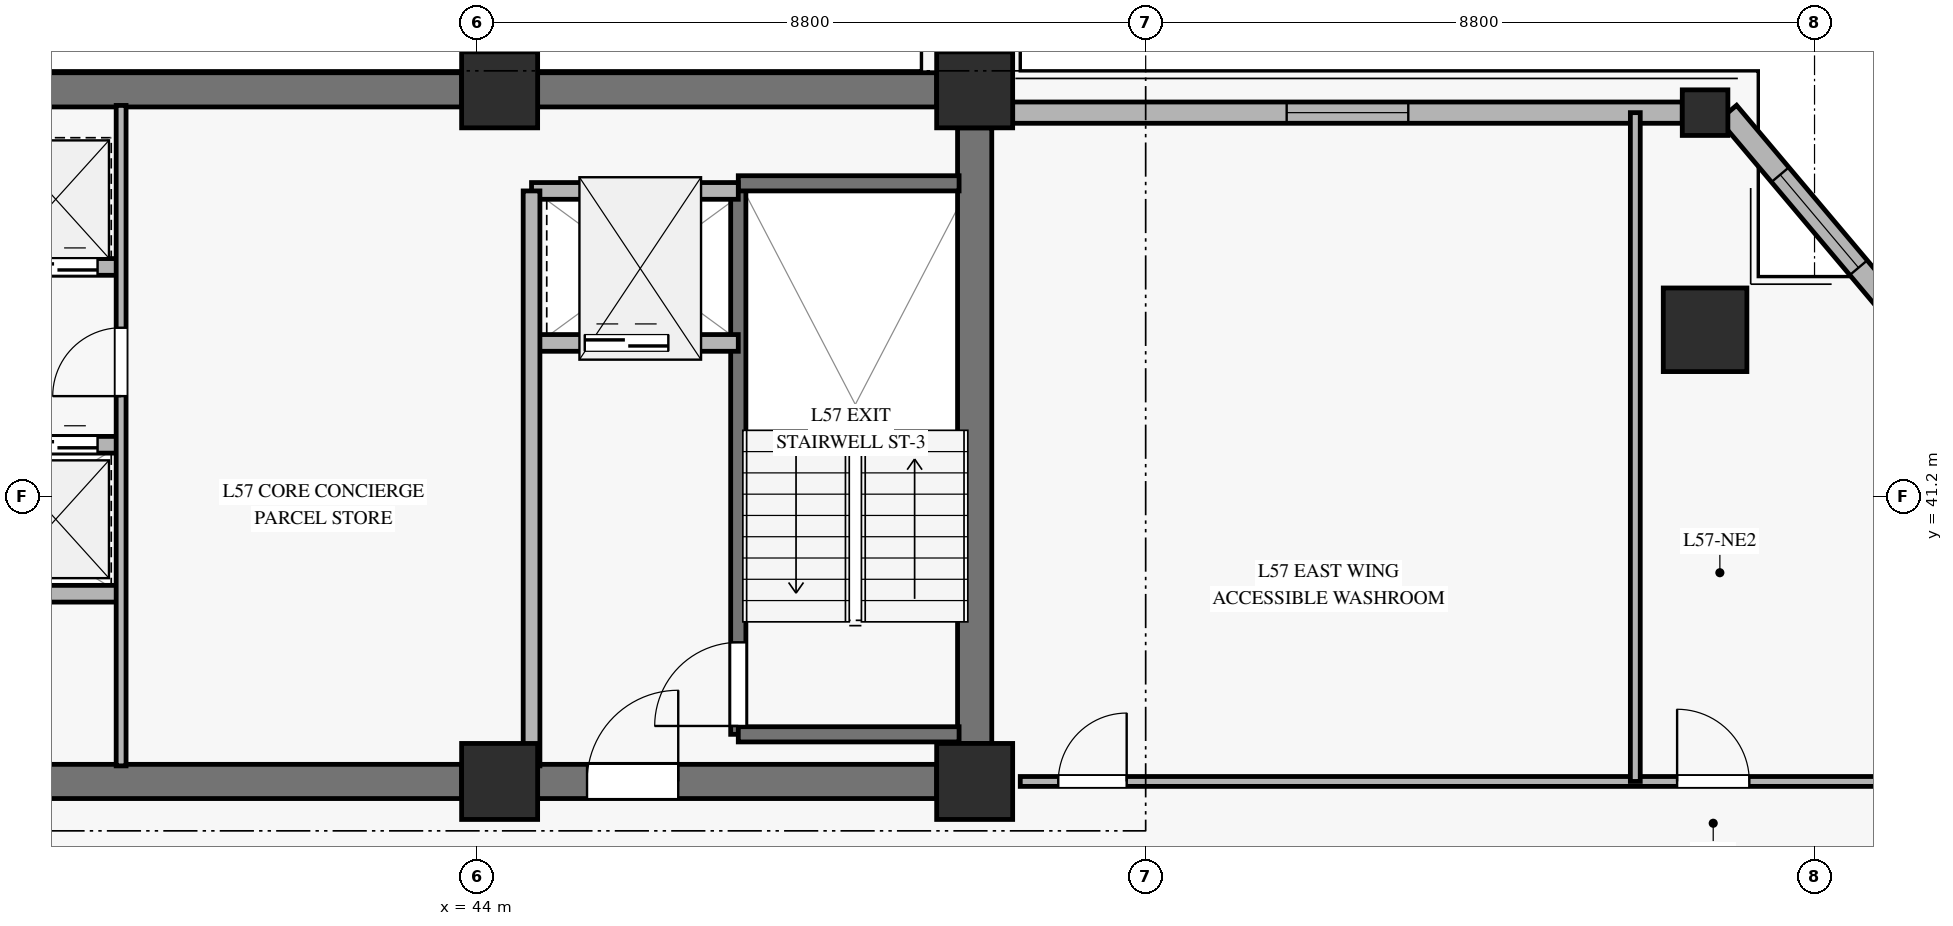
"""IFC4 building model, lengths in metres.
Left out: names, types, materials, properties, quantities, classifications, styles, units other than length and angle.
Written with IfcOpenShell. Run it as: python <this file> out.ifc"""

import sys

from ifc_helpers import new_model, si_unit, direction, frame, frame_2d, origin, origin_2d, place, context, subcontext, project, spatial, rectangle, hollow_rectangle, extrude, source, transform, mapped, element, fill, save


model = new_model("IFC4")
c1 = context("Model", 3, precision=1e-05, world=origin(), true_north=direction((0.0, 1.0)))
c2 = subcontext(c1, "Body", "Model", "MODEL_VIEW")
j1 = project(units=[si_unit("LENGTHUNIT", "METRE"), si_unit("PLANEANGLEUNIT", "RADIAN")], contexts=[c1])
p1 = place(None, origin())
s1 = spatial("IfcSite", under=j1, at=p1, CompositionType="ELEMENT")
p2 = place(p1, origin())
s2 = spatial("IfcBuilding", under=s1, at=p2, CompositionType="ELEMENT")
p3 = place(p2, frame((0.0, 0.0, 227.0)))
s3 = spatial("IfcBuildingStorey", under=s2, at=p3, CompositionType="ELEMENT", Elevation=227.0)
m1 = source(origin(), c2, "Body", "SweptSolid", [
    extrude(rectangle(XDim=1.0, YDim=1.0, at=origin_2d()), origin(), (0.0, 0.0, 1.0), 3.185),
])
for number, where, z_axis, x_axis in (
    (1, (44.3, 37.45, 0.0), (0.0, 0.0, 1.0), (1.0, 0.0, 0.0)),
    (2, (44.3, 46.55, 0.0), (0.0, 0.0, 1.0), (1.0, 0.0, 0.0)),
    (3, (50.55, 37.45, 0.0), (0.0, 0.0, 1.0), (1.0, 0.0, 0.0)),
    (4, (50.55, 46.55, 0.0), (0.0, 0.0, 1.0), (1.0, 0.0, 0.0)),
):
    element("IfcColumn", number, at=place(p3, frame(where, z_axis=z_axis, x_axis=x_axis)), inside=s3, PredefinedType="PILASTER", context=c2, shape_type="MappedRepresentation", body=[
        mapped(m1, transform((0.0, 0.0, 0.0), x_axis=(1.0, 0.0, 0.0), y_axis=(0.0, 1.0, 0.0), z_axis=(0.0, 0.0, 1.0), scale=1.0)),
    ])
p4 = place(p3, frame((36.1, 46.55, 0.0), z_axis=(0.0, 0.0, 1.0), x_axis=(1.0, 0.0, 0.0)))
e5 = element("IfcWall", 5, at=p4, inside=s3, PredefinedType="SHEAR", context=c2, shape_type="SweptSolid", body=[
    extrude(rectangle(XDim=7.7, YDim=0.45, at=frame_2d((3.85, 0.0))), origin(), (0.0, 0.0, 1.0), 3.185),
])
p5 = place(p3, frame((44.8, 46.55, 0.0), z_axis=(0.0, 0.0, 1.0), x_axis=(1.0, 0.0, 0.0)))
e6 = element("IfcWall", 6, at=p5, inside=s3, PredefinedType="SHEAR", context=c2, shape_type="SweptSolid", body=[
    extrude(rectangle(XDim=5.25, YDim=0.45, at=frame_2d((2.625, 0.0))), origin(), (0.0, 0.0, 1.0), 3.185),
])
p6 = place(p3, frame((36.1, 37.45, 0.0), z_axis=(0.0, 0.0, 1.0), x_axis=(1.0, 0.0, 0.0)))
e7 = element("IfcWall", 7, at=p6, inside=s3, PredefinedType="SHEAR", context=c2, shape_type="SweptSolid", body=[
    extrude(rectangle(XDim=7.7, YDim=0.45, at=frame_2d((3.85, 0.0))), origin(), (0.0, 0.0, 1.0), 3.185),
])
p7 = place(p3, frame((44.8, 37.45, 0.0), z_axis=(0.0, 0.0, 1.0), x_axis=(1.0, 0.0, 0.0)))
e8 = element("IfcWall", 8, at=p7, inside=s3, PredefinedType="SHEAR", context=c2, shape_type="SweptSolid", body=[
    extrude(rectangle(XDim=5.25, YDim=0.45, at=frame_2d((2.625, 0.0))), origin(), (0.0, 0.0, 1.0), 3.185),
])
p8 = place(p7, frame((0.65, 0.0, 0.0)))
e9 = element("IfcOpeningElement", 9, at=p8, cuts=e8, PredefinedType="OPENING", context=c2, shape_type="SweptSolid", body=[
    extrude(rectangle(XDim=1.2, YDim=2.15, at=frame_2d((0.6, 1.075))), frame((0.0, 0.235, 0.0), z_axis=(0.0, -1.0, 0.0), x_axis=(1.0, 0.0, 0.0)), (0.0, 0.0, 1.0), 0.47),
])
p9 = place(p3, frame((50.55, 37.95, 0.0), z_axis=(0.0, 0.0, 1.0), x_axis=(0.0, 1.0, 0.0)))
e10 = element("IfcWall", 10, at=p9, inside=s3, PredefinedType="SHEAR", context=c2, shape_type="SweptSolid", body=[
    extrude(rectangle(XDim=8.1, YDim=0.45, at=frame_2d((4.05, 0.0))), origin(), (0.0, 0.0, 1.0), 3.185),
])
m2 = source(origin(), c2, "Body", "SweptSolid", [
    extrude(hollow_rectangle(XDim=1.1, YDim=1.1, WallThickness=0.05, at=origin_2d()), origin(), (0.0, 0.0, 1.0), 3.185),
])
p10 = place(p3, frame((60.16, 43.393, 0.0), z_axis=(0.0, 0.0, 1.0), x_axis=(1.0, 0.0, 0.0)))
e11 = element("IfcColumn", 11, at=p10, inside=s3, PredefinedType="COLUMN", context=c2, shape_type="MappedRepresentation", body=[
    mapped(m2, transform((0.0, 0.0, 0.0), x_axis=(1.0, 0.0, 0.0), y_axis=(0.0, 1.0, 0.0), z_axis=(0.0, 0.0, 1.0), scale=1.0)),
])
m3 = source(origin(), c2, "Body", "SweptSolid", [
    extrude(hollow_rectangle(XDim=0.6, YDim=0.6, WallThickness=0.028, at=origin_2d()), origin(), (0.0, 0.0, 1.0), 3.185),
])
p11 = place(p3, frame((60.16, 46.25, 0.0), z_axis=(0.0, 0.0, 1.0), x_axis=(1.0, 0.0, 0.0)))
e12 = element("IfcColumn", 12, at=p11, inside=s3, PredefinedType="COLUMN", context=c2, shape_type="MappedRepresentation", body=[
    mapped(m3, transform((0.0, 0.0, 0.0), x_axis=(1.0, 0.0, 0.0), y_axis=(0.0, 1.0, 0.0), z_axis=(0.0, 0.0, 1.0), scale=1.0)),
])
p12 = place(p3, frame((51.05, 46.25, 0.0), z_axis=(0.0, 0.0, 1.0), x_axis=(1.0, 0.0, 0.0)))
e13 = element("IfcWall", 13, at=p12, inside=s3, PredefinedType="SOLIDWALL", context=c2, shape_type="SweptSolid", body=[
    extrude(rectangle(XDim=8.81, YDim=0.28, at=frame_2d((4.405, 0.0))), origin(), (0.0, 0.0, 1.0), 2.815),
])
p13 = place(p12, frame((3.605, 0.0, 0.45)))
e14 = element("IfcOpeningElement", 14, at=p13, cuts=e13, PredefinedType="OPENING", context=c2, shape_type="SweptSolid", body=[
    extrude(rectangle(XDim=1.6, YDim=2.0, at=frame_2d((0.8, 1.0))), frame((0.0, 0.15, 0.0), z_axis=(0.0, -1.0, 0.0), x_axis=(1.0, 0.0, 0.0)), (0.0, 0.0, 1.0), 0.3),
])
p14 = place(p3, frame((62.867, 43.393, 0.0), z_axis=(0.0, 0.0, 1.0), x_axis=(-0.644314839722, 0.764760346326, 0.0)))
e15 = element("IfcWall", 15, at=p14, inside=s3, PredefinedType="SOLIDWALL", context=c2, shape_type="SweptSolid", body=[
    extrude(rectangle(XDim=3.736, YDim=0.3, at=frame_2d((1.868, 0.0))), origin(), (0.0, 0.0, 1.0), 2.815),
])
p15 = place(p14, frame((1.068, 0.0, 0.45)))
e16 = element("IfcOpeningElement", 16, at=p15, cuts=e15, PredefinedType="OPENING", context=c2, shape_type="SweptSolid", body=[
    extrude(rectangle(XDim=1.6, YDim=2.0, at=frame_2d((0.8, 1.0))), frame((0.0, 0.16, 0.0), z_axis=(0.0, -1.0, 0.0), x_axis=(1.0, 0.0, 0.0)), (0.0, 0.0, 1.0), 0.32),
])
p16 = place(p3, frame((47.44, 38.07, 0.0), z_axis=(0.0, 0.0, 1.0), x_axis=(0.0, 1.0, 0.0)))
e17 = element("IfcWall", 17, at=p16, inside=s3, PredefinedType="SOLIDWALL", context=c2, shape_type="SweptSolid", body=[
    extrude(rectangle(XDim=7.25, YDim=0.2, at=frame_2d((3.625, 0.0))), origin(), (0.0, 0.0, 1.0), 3.4),
])
p17 = place(p16, frame((0.11, 0.0, 0.0)))
e18 = element("IfcOpeningElement", 18, at=p17, cuts=e17, PredefinedType="OPENING", context=c2, shape_type="SweptSolid", body=[
    extrude(rectangle(XDim=1.1, YDim=2.15, at=frame_2d((0.55, 1.075))), frame((0.0, 0.11, 0.0), z_axis=(0.0, -1.0, 0.0), x_axis=(1.0, 0.0, 0.0)), (0.0, 0.0, 1.0), 0.22),
])
for number, where, z_axis, x_axis in (
    (19, (47.44, 45.32, 0.0), (0.0, 0.0, 1.0), (1.0, 0.0, 0.0)),
    (20, (47.44, 38.07, 0.0), (0.0, 0.0, 1.0), (1.0, 0.0, 0.0)),
):
    element("IfcWall", number, at=place(p3, frame(where, z_axis=z_axis, x_axis=x_axis)), inside=s3, PredefinedType="SOLIDWALL", context=c2, shape_type="SweptSolid", body=[
        extrude(rectangle(XDim=2.905, YDim=0.2, at=frame_2d((1.453, 0.0))), origin(), (0.0, 0.0, 1.0), 3.4),
    ])
p18 = place(p3, frame((44.72, 43.22, 0.0), z_axis=(0.0, 0.0, 1.0), x_axis=(1.0, 0.0, 0.0)))
e21 = element("IfcWall", 21, at=p18, inside=s3, PredefinedType="SOLIDWALL", context=c2, shape_type="SweptSolid", body=[
    extrude(rectangle(XDim=2.72, YDim=0.22, at=frame_2d((1.36, 0.0))), origin(), (0.0, 0.0, 1.0), 3.185),
])
p19 = place(p18, frame((0.7, 0.0, 0.0)))
e22 = element("IfcOpeningElement", 22, at=p19, cuts=e21, PredefinedType="OPENING", context=c2, shape_type="SweptSolid", body=[
    extrude(rectangle(XDim=1.1, YDim=2.2, at=frame_2d((0.55, 1.1))), frame((0.0, 0.12, 0.0), z_axis=(0.0, -1.0, 0.0), x_axis=(1.0, 0.0, 0.0)), (0.0, 0.0, 1.0), 0.24),
])
p20 = place(p3, frame((44.72, 45.22, 0.0), z_axis=(0.0, 0.0, 1.0), x_axis=(1.0, 0.0, 0.0)))
e23 = element("IfcWall", 23, at=p20, inside=s3, PredefinedType="SOLIDWALL", context=c2, shape_type="SweptSolid", body=[
    extrude(rectangle(XDim=2.72, YDim=0.22, at=frame_2d((1.36, 0.0))), origin(), (0.0, 0.0, 1.0), 3.185),
])
p21 = place(p3, frame((44.72, 37.655, 0.0), z_axis=(0.0, 0.0, 1.0), x_axis=(0.0, 1.0, 0.0)))
e24 = element("IfcWall", 24, at=p21, inside=s3, PredefinedType="SOLIDWALL", context=c2, shape_type="SweptSolid", body=[
    extrude(rectangle(XDim=7.565, YDim=0.22, at=frame_2d((3.782, 0.0))), origin(), (0.0, 0.0, 1.0), 3.185),
])
p22 = place(p3, frame((36.12, 44.22, 0.0), z_axis=(0.0, 0.0, 1.0), x_axis=(1.0, 0.0, 0.0)))
e25 = element("IfcWall", 25, at=p22, inside=s3, PredefinedType="SOLIDWALL", context=c2, shape_type="SweptSolid", body=[
    extrude(rectangle(XDim=3.2, YDim=0.22, at=frame_2d((1.6, 0.0))), origin(), (0.0, 0.0, 1.0), 3.185),
])
p23 = place(p22, frame((0.3, 0.0, 0.0)))
e26 = element("IfcOpeningElement", 26, at=p23, cuts=e25, PredefinedType="OPENING", context=c2, shape_type="SweptSolid", body=[
    extrude(rectangle(XDim=1.1, YDim=2.2, at=frame_2d((0.55, 1.1))), frame((0.0, 0.12, 0.0), z_axis=(0.0, -1.0, 0.0), x_axis=(1.0, 0.0, 0.0)), (0.0, 0.0, 1.0), 0.24),
])
p24 = place(p22, frame((1.79, 0.0, 0.0)))
e27 = element("IfcOpeningElement", 27, at=p24, cuts=e25, PredefinedType="OPENING", context=c2, shape_type="SweptSolid", body=[
    extrude(rectangle(XDim=1.1, YDim=2.2, at=frame_2d((0.55, 1.1))), frame((0.0, 0.12, 0.0), z_axis=(0.0, -1.0, 0.0), x_axis=(1.0, 0.0, 0.0)), (0.0, 0.0, 1.0), 0.24),
])
p25 = place(p3, frame((36.12, 41.88, 0.0), z_axis=(0.0, 0.0, 1.0), x_axis=(1.0, 0.0, 0.0)))
e28 = element("IfcWall", 28, at=p25, inside=s3, PredefinedType="SOLIDWALL", context=c2, shape_type="SweptSolid", body=[
    extrude(rectangle(XDim=3.2, YDim=0.22, at=frame_2d((1.6, 0.0))), origin(), (0.0, 0.0, 1.0), 3.185),
])
p26 = place(p25, frame((0.3, 0.0, 0.0)))
e29 = element("IfcOpeningElement", 29, at=p26, cuts=e28, PredefinedType="OPENING", context=c2, shape_type="SweptSolid", body=[
    extrude(rectangle(XDim=1.1, YDim=2.2, at=frame_2d((0.55, 1.1))), frame((0.0, 0.12, 0.0), z_axis=(0.0, -1.0, 0.0), x_axis=(1.0, 0.0, 0.0)), (0.0, 0.0, 1.0), 0.24),
])
p27 = place(p25, frame((1.79, 0.0, 0.0)))
e30 = element("IfcOpeningElement", 30, at=p27, cuts=e28, PredefinedType="OPENING", context=c2, shape_type="SweptSolid", body=[
    extrude(rectangle(XDim=1.1, YDim=2.2, at=frame_2d((0.55, 1.1))), frame((0.0, 0.12, 0.0), z_axis=(0.0, -1.0, 0.0), x_axis=(1.0, 0.0, 0.0)), (0.0, 0.0, 1.0), 0.24),
])
p28 = place(p3, frame((36.12, 39.92, 0.0), z_axis=(0.0, 0.0, 1.0), x_axis=(1.0, 0.0, 0.0)))
e31 = element("IfcWall", 31, at=p28, inside=s3, PredefinedType="SOLIDWALL", context=c2, shape_type="SweptSolid", body=[
    extrude(rectangle(XDim=3.2, YDim=0.22, at=frame_2d((1.6, 0.0))), origin(), (0.0, 0.0, 1.0), 3.185),
])
p29 = place(p3, frame((39.32, 37.655, 0.0), z_axis=(0.0, 0.0, 1.0), x_axis=(0.0, 1.0, 0.0)))
e32 = element("IfcWall", 32, at=p29, inside=s3, PredefinedType="PARTITIONING", context=c2, shape_type="SweptSolid", body=[
    extrude(rectangle(XDim=8.69, YDim=0.13, at=frame_2d((4.345, 0.0))), origin(), (0.0, 0.0, 1.0), 3.185),
])
p30 = place(p29, frame((4.865, 0.0, 0.0)))
e33 = element("IfcOpeningElement", 33, at=p30, cuts=e32, PredefinedType="OPENING", context=c2, shape_type="SweptSolid", body=[
    extrude(rectangle(XDim=0.9, YDim=2.1, at=frame_2d((0.45, 1.05))), frame((0.0, 0.075, 0.0), z_axis=(0.0, -1.0, 0.0), x_axis=(1.0, 0.0, 0.0)), (0.0, 0.0, 1.0), 0.15),
])
p31 = place(p3, frame((51.15, 37.45, 0.0), z_axis=(0.0, 0.0, 1.0), x_axis=(1.0, 0.0, 0.0)))
e34 = element("IfcWall", 34, at=p31, inside=s3, PredefinedType="PARTITIONING", context=c2, shape_type="SweptSolid", body=[
    extrude(rectangle(XDim=11.717, YDim=0.13, at=frame_2d((5.858, 0.0))), origin(), (0.0, 0.0, 1.0), 2.82),
])
p32 = place(p31, frame((0.5, 0.0, 0.0)))
e35 = element("IfcOpeningElement", 35, at=p32, cuts=e34, PredefinedType="OPENING", context=c2, shape_type="SweptSolid", body=[
    extrude(rectangle(XDim=0.9, YDim=2.1, at=frame_2d((0.45, 1.05))), frame((0.0, 0.075, 0.0), z_axis=(0.0, -1.0, 0.0), x_axis=(1.0, 0.0, 0.0)), (0.0, 0.0, 1.0), 0.15),
])
p33 = place(p31, frame((8.642, 0.0, 0.0)))
e36 = element("IfcOpeningElement", 36, at=p33, cuts=e34, PredefinedType="OPENING", context=c2, shape_type="SweptSolid", body=[
    extrude(rectangle(XDim=0.95, YDim=2.1, at=frame_2d((0.475, 1.05))), frame((0.0, 0.075, 0.0), z_axis=(0.0, -1.0, 0.0), x_axis=(1.0, 0.0, 0.0)), (0.0, 0.0, 1.0), 0.15),
])
p34 = place(p3, frame((59.242, 37.45, 0.0), z_axis=(0.0, 0.0, 1.0), x_axis=(0.0, 1.0, 0.0)))
e37 = element("IfcWall", 37, at=p34, inside=s3, PredefinedType="PARTITIONING", context=c2, shape_type="SweptSolid", body=[
    extrude(rectangle(XDim=8.8, YDim=0.13, at=frame_2d((4.4, 0.0))), origin(), (0.0, 0.0, 1.0), 3.185),
])
m4 = source(origin(), c2, "Body", "SweptSolid", [
    extrude(rectangle(XDim=1.6, YDim=2.0, at=frame_2d((0.8, 1.0))), frame((0.0, 0.03, 0.0), z_axis=(0.0, -1.0, 0.0), x_axis=(1.0, 0.0, 0.0)), (0.0, 0.0, 1.0), 0.06),
])
p35 = place(p13, origin())
e38 = element("IfcWindow", 38, at=p35, inside=s3, PartitioningType="SINGLE_PANEL", PredefinedType="WINDOW", context=c2, shape_type="MappedRepresentation", body=[
    mapped(m4, transform((0.0, 0.0, 0.0), x_axis=(1.0, 0.0, 0.0), y_axis=(0.0, 1.0, 0.0), z_axis=(0.0, 0.0, 1.0), scale=1.0)),
])
fill(e14, e38)
p36 = place(p15, origin())
e39 = element("IfcWindow", 39, at=p36, inside=s3, PartitioningType="SINGLE_PANEL", PredefinedType="WINDOW", context=c2, shape_type="MappedRepresentation", body=[
    mapped(m4, transform((0.0, 0.0, 0.0), x_axis=(1.0, 0.0, 0.0), y_axis=(0.0, 1.0, 0.0), z_axis=(0.0, 0.0, 1.0), scale=1.0)),
])
fill(e16, e39)
m5 = source(origin(), c2, "Body", "SweptSolid", [
    extrude(rectangle(XDim=1.1, YDim=2.15, at=frame_2d((0.55, 1.075))), frame((0.0, 0.025, 0.0), z_axis=(0.0, -1.0, 0.0), x_axis=(1.0, 0.0, 0.0)), (0.0, 0.0, 1.0), 0.05),
])
p37 = place(p17, origin())
e40 = element("IfcDoor", 40, at=p37, inside=s3, OperationType="SINGLE_SWING_LEFT", PredefinedType="DOOR", context=c2, shape_type="MappedRepresentation", body=[
    mapped(m5, transform((0.0, 0.0, 0.0), x_axis=(1.0, 0.0, 0.0), y_axis=(0.0, 1.0, 0.0), z_axis=(0.0, 0.0, 1.0), scale=1.0)),
])
fill(e18, e40)
m6 = source(origin(), c2, "Body", "SweptSolid", [
    extrude(rectangle(XDim=1.1, YDim=2.2, at=frame_2d((0.55, 1.1))), frame((0.0, 0.025, 0.0), z_axis=(0.0, -1.0, 0.0), x_axis=(1.0, 0.0, 0.0)), (0.0, 0.0, 1.0), 0.05),
])
p38 = place(p19, origin())
e41 = element("IfcDoor", 41, at=p38, inside=s3, OperationType="SLIDING_TO_LEFT", PredefinedType="DOOR", context=c2, shape_type="MappedRepresentation", body=[
    mapped(m6, transform((0.0, 0.0, 0.0), x_axis=(1.0, 0.0, 0.0), y_axis=(0.0, 1.0, 0.0), z_axis=(0.0, 0.0, 1.0), scale=1.0)),
])
fill(e22, e41)
m7 = source(origin(), c2, "Body", "SweptSolid", [
    extrude(rectangle(XDim=1.2, YDim=2.15, at=frame_2d((0.6, 1.075))), frame((0.0, 0.025, 0.0), z_axis=(0.0, -1.0, 0.0), x_axis=(1.0, 0.0, 0.0)), (0.0, 0.0, 1.0), 0.05),
])
p39 = place(p8, origin())
e42 = element("IfcDoor", 42, at=p39, inside=s3, OperationType="SINGLE_SWING_RIGHT", PredefinedType="DOOR", context=c2, shape_type="MappedRepresentation", body=[
    mapped(m7, transform((0.0, 0.0, 0.0), x_axis=(1.0, 0.0, 0.0), y_axis=(0.0, 1.0, 0.0), z_axis=(0.0, 0.0, 1.0), scale=1.0)),
])
fill(e9, e42)
p40 = place(p24, origin())
e43 = element("IfcDoor", 43, at=p40, inside=s3, OperationType="SLIDING_TO_LEFT", PredefinedType="DOOR", context=c2, shape_type="MappedRepresentation", body=[
    mapped(m6, transform((0.0, 0.0, 0.0), x_axis=(1.0, 0.0, 0.0), y_axis=(0.0, 1.0, 0.0), z_axis=(0.0, 0.0, 1.0), scale=1.0)),
])
fill(e27, e43)
p41 = place(p27, origin())
e44 = element("IfcDoor", 44, at=p41, inside=s3, OperationType="SLIDING_TO_LEFT", PredefinedType="DOOR", context=c2, shape_type="MappedRepresentation", body=[
    mapped(m6, transform((0.0, 0.0, 0.0), x_axis=(1.0, 0.0, 0.0), y_axis=(0.0, 1.0, 0.0), z_axis=(0.0, 0.0, 1.0), scale=1.0)),
])
fill(e30, e44)
m8 = source(origin(), c2, "Body", "SweptSolid", [
    extrude(rectangle(XDim=0.9, YDim=2.1, at=frame_2d((0.45, 1.05))), frame((0.0, 0.025, 0.0), z_axis=(0.0, -1.0, 0.0), x_axis=(1.0, 0.0, 0.0)), (0.0, 0.0, 1.0), 0.05),
])
p42 = place(p30, origin())
e45 = element("IfcDoor", 45, at=p42, inside=s3, OperationType="SINGLE_SWING_LEFT", PredefinedType="DOOR", context=c2, shape_type="MappedRepresentation", body=[
    mapped(m8, transform((0.0, 0.0, 0.0), x_axis=(1.0, 0.0, 0.0), y_axis=(0.0, 1.0, 0.0), z_axis=(0.0, 0.0, 1.0), scale=1.0)),
])
fill(e33, e45)
p43 = place(p32, origin())
e46 = element("IfcDoor", 46, at=p43, inside=s3, OperationType="SINGLE_SWING_RIGHT", PredefinedType="DOOR", context=c2, shape_type="MappedRepresentation", body=[
    mapped(m8, transform((0.0, 0.0, 0.0), x_axis=(1.0, 0.0, 0.0), y_axis=(0.0, 1.0, 0.0), z_axis=(0.0, 0.0, 1.0), scale=1.0)),
])
fill(e35, e46)
m9 = source(origin(), c2, "Body", "SweptSolid", [
    extrude(rectangle(XDim=0.95, YDim=2.1, at=frame_2d((0.475, 1.05))), frame((0.0, 0.025, 0.0), z_axis=(0.0, -1.0, 0.0), x_axis=(1.0, 0.0, 0.0)), (0.0, 0.0, 1.0), 0.05),
])
p44 = place(p33, origin())
e47 = element("IfcDoor", 47, at=p44, inside=s3, OperationType="SINGLE_SWING_LEFT", PredefinedType="DOOR", context=c2, shape_type="MappedRepresentation", body=[
    mapped(m9, transform((0.0, 0.0, 0.0), x_axis=(1.0, 0.0, 0.0), y_axis=(0.0, 1.0, 0.0), z_axis=(0.0, 0.0, 1.0), scale=1.0)),
])
fill(e36, e47)
save(model, sys.argv[1])
